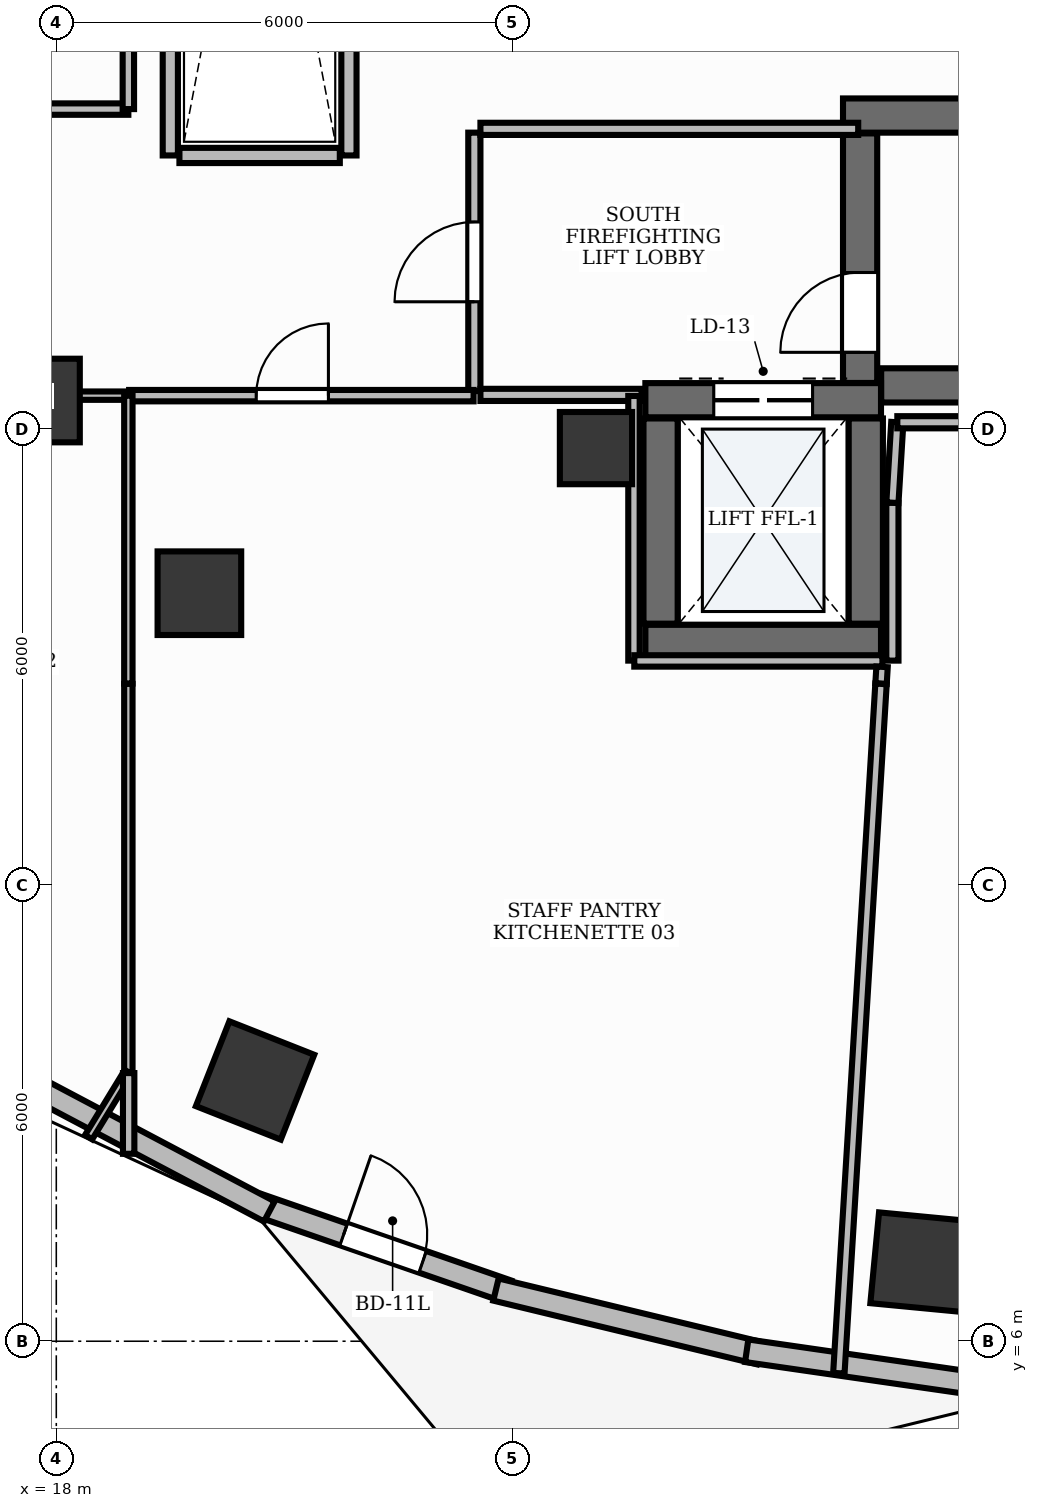
"""IFC4 building model, lengths in metres.
Left out: names, types, materials, properties, quantities, classifications, styles, units other than length and angle.
Written with IfcOpenShell. Run it as: python <this file> out.ifc"""

import sys

from ifc_helpers import new_model, si_unit, direction, frame, frame_2d, origin, origin_2d, place, context, subcontext, project, spatial, rectangle, extrude, element, fill, save


model = new_model("IFC4")
c1 = context("Model", 3, precision=1e-05, world=origin(), true_north=direction((0.0, 1.0)))
c2 = subcontext(c1, "Body", "Model", "MODEL_VIEW")
j1 = project(units=[si_unit("LENGTHUNIT", "METRE"), si_unit("PLANEANGLEUNIT", "RADIAN")], contexts=[c1])
p1 = place(None, origin())
s1 = spatial("IfcSite", under=j1, at=p1, CompositionType="ELEMENT")
p2 = place(p1, origin())
s2 = spatial("IfcBuilding", under=s1, at=p2, CompositionType="ELEMENT")
p3 = place(p2, frame((0.0, 0.0, 140.4)))
s3 = spatial("IfcBuildingStorey", under=s2, at=p3, CompositionType="ELEMENT", Elevation=140.4)
p4 = place(p3, frame((28.852, 18.575, 0.0), z_axis=(0.0, 0.0, 1.0), x_axis=(1.0, 0.0, 0.0)))
e1 = element("IfcWall", 1, at=p4, inside=s3, PredefinedType="SHEAR", context=c2, shape_type="SweptSolid", body=[
    extrude(rectangle(XDim=8.248, YDim=0.45, at=frame_2d((4.124, 0.0))), origin(), (0.0, 0.0, 1.0), 3.9),
])
p5 = place(p3, frame((28.35, 22.125, 0.0), z_axis=(0.0, 0.0, 1.0), x_axis=(1.0, 0.0, 0.0)))
e2 = element("IfcWall", 2, at=p5, inside=s3, PredefinedType="SHEAR", context=c2, shape_type="SweptSolid", body=[
    extrude(rectangle(XDim=8.75, YDim=0.45, at=frame_2d((4.375, 0.0))), origin(), (0.0, 0.0, 1.0), 3.9),
])
p6 = place(p3, frame((28.575, 18.607, 0.0), z_axis=(0.0, 0.0, 1.0), x_axis=(0.0, 1.0, 0.0)))
e3 = element("IfcWall", 3, at=p6, inside=s3, PredefinedType="SHEAR", context=c2, shape_type="SweptSolid", body=[
    extrude(rectangle(XDim=3.283, YDim=0.45, at=frame_2d((1.642, 0.0))), origin(), (0.0, 0.0, 1.0), 3.9),
])
p7 = place(p6, frame((0.403, 0.0, 0.0)))
e4 = element("IfcOpeningElement", 4, at=p7, cuts=e3, PredefinedType="OPENING", context=c2, shape_type="SweptSolid", body=[
    extrude(rectangle(XDim=1.05, YDim=2.15, at=frame_2d((0.525, 1.075))), frame((0.0, 0.24, 0.0), z_axis=(0.0, -1.0, 0.0), x_axis=(1.0, 0.0, 0.0)), (0.0, 0.0, 1.0), 0.48),
])
p8 = place(p3, frame((25.75, 15.2, 0.0), z_axis=(0.0, 0.0, 1.0), x_axis=(1.0, 0.0, 0.0)))
e5 = element("IfcWall", 5, at=p8, inside=s3, PredefinedType="SHEAR", context=c2, shape_type="SweptSolid", body=[
    extrude(rectangle(XDim=3.1, YDim=0.45, at=frame_2d((1.55, 0.0))), origin(), (0.0, 0.0, 1.0), 3.9),
])
p9 = place(p3, frame((25.75, 18.38, 0.0), z_axis=(0.0, 0.0, 1.0), x_axis=(1.0, 0.0, 0.0)))
e6 = element("IfcWall", 6, at=p9, inside=s3, PredefinedType="SHEAR", context=c2, shape_type="SweptSolid", body=[
    extrude(rectangle(XDim=3.1, YDim=0.45, at=frame_2d((1.55, 0.0))), origin(), (0.0, 0.0, 1.0), 3.9),
])
p10 = place(p9, frame((0.9, 0.0, 0.0)))
e7 = element("IfcOpeningElement", 7, at=p10, cuts=e6, PredefinedType="OPENING", context=c2, shape_type="SweptSolid", body=[
    extrude(rectangle(XDim=1.3, YDim=2.2, at=frame_2d((0.65, 1.1))), frame((0.0, 0.24, 0.0), z_axis=(0.0, -1.0, 0.0), x_axis=(1.0, 0.0, 0.0)), (0.0, 0.0, 1.0), 0.48),
])
for number, where, z_axis, x_axis in (
    (8, (25.95, 15.44, 0.0), (0.0, 0.0, 1.0), (0.0, 1.0, 0.0)),
    (9, (28.65, 15.44, 0.0), (0.0, 0.0, 1.0), (0.0, 1.0, 0.0)),
):
    element("IfcWall", number, at=place(p3, frame(where, z_axis=z_axis, x_axis=x_axis)), inside=s3, PredefinedType="SHEAR", context=c2, shape_type="SweptSolid", body=[
        extrude(rectangle(XDim=2.7, YDim=0.45, at=frame_2d((1.35, 0.0))), origin(), (0.0, 0.0, 1.0), 3.9),
    ])
p11 = place(p3, frame((25.1, 17.75, -0.0), z_axis=(0.0, 0.0, 1.0), x_axis=(1.0, 0.0, 0.0)))
e10 = element("IfcColumn", 10, at=p11, inside=s3, PredefinedType="PILASTER", context=c2, shape_type="SweptSolid", body=[
    extrude(rectangle(XDim=0.95, YDim=0.95, at=origin_2d()), origin(), (0.0, 0.0, 1.0), 3.901),
])
for number, where, z_axis, x_axis in (
    (11, (17.759, 18.376, -0.0), (0.0, 0.0, 1.0), (1.0, 0.0, 0.0)),
    (12, (19.883, 15.841, -0.0), (0.0, 0.0, 1.0), (1.0, 0.0, 0.0)),
):
    element("IfcColumn", number, at=place(p3, frame(where, z_axis=z_axis, x_axis=x_axis)), inside=s3, PredefinedType="COLUMN", context=c2, shape_type="SweptSolid", body=[
        extrude(rectangle(XDim=1.1, YDim=1.1, at=origin_2d()), origin(), (0.0, 0.0, 1.0), 3.901),
    ])
for number, where, z_axis, x_axis in (
    (13, (20.615, 9.431, -0.0), (0.0, 0.0, 1.0), (-0.93, 0.367, 0.0)),
    (14, (29.364, 7.041, -0.0), (0.0, 0.0, 1.0), (-0.995, 0.095, 0.0)),
):
    element("IfcColumn", number, at=place(p3, frame(where, z_axis=z_axis, x_axis=x_axis)), inside=s3, PredefinedType="COLUMN", context=c2, shape_type="SweptSolid", body=[
        extrude(rectangle(XDim=1.2, YDim=1.2, at=origin_2d()), origin(), (0.0, 0.0, 1.0), 3.901),
    ])
p12 = place(p3, frame((20.662, 7.792, 0.0), z_axis=(0.0, 0.0, 1.0), x_axis=(0.944878029854, -0.3274225232, 0.0)))
e15 = element("IfcWall", 15, at=p12, inside=s3, PredefinedType="STANDARD", context=c2, shape_type="SweptSolid", body=[
    extrude(rectangle(XDim=3.467, YDim=0.3, at=frame_2d((1.734, 0.0))), origin(), (0.0, 0.0, 1.0), 3.47),
])
p13 = place(p12, frame((1.184, 0.0, 0.0)))
e16 = element("IfcOpeningElement", 16, at=p13, cuts=e15, PredefinedType="OPENING", context=c2, shape_type="SweptSolid", body=[
    extrude(rectangle(XDim=1.1, YDim=2.15, at=frame_2d((0.55, 1.075))), frame((0.0, 0.165, 0.0), z_axis=(0.0, -1.0, 0.0), x_axis=(1.0, 0.0, 0.0)), (0.0, 0.0, 1.0), 0.33),
])
p14 = place(p3, frame((14.967, 10.794, 0.0), z_axis=(0.0, 0.0, 1.0), x_axis=(0.883986649445, -0.467512142734, 0.0)))
e17 = element("IfcWall", 17, at=p14, inside=s3, PredefinedType="STANDARD", context=c2, shape_type="SweptSolid", body=[
    extrude(rectangle(XDim=6.601, YDim=0.3, at=frame_2d((3.301, 0.0))), origin(), (0.0, 0.0, 1.0), 3.9),
])
p15 = place(p3, frame((23.784, 6.68, 0.0), z_axis=(0.0, 0.0, 1.0), x_axis=(0.972043452321, -0.234801036625, 0.0)))
e18 = element("IfcWall", 18, at=p15, inside=s3, PredefinedType="STANDARD", context=c2, shape_type="SweptSolid", body=[
    extrude(rectangle(XDim=3.569, YDim=0.3, at=frame_2d((1.784, 0.0))), origin(), (0.0, 0.0, 1.0), 3.9),
])
p16 = place(p3, frame((27.083, 5.875, 0.0), z_axis=(0.0, 0.0, 1.0), x_axis=(0.989734732902, -0.142916613754, 0.0)))
e19 = element("IfcWall", 19, at=p16, inside=s3, PredefinedType="STANDARD", context=c2, shape_type="SweptSolid", body=[
    extrude(rectangle(XDim=3.611, YDim=0.3, at=frame_2d((1.806, 0.0))), origin(), (0.0, 0.0, 1.0), 3.47),
])
for number, where, z_axis, x_axis in (
    (20, (19.5, 21.6, 0.0), (0.0, 0.0, 1.0), (0.0, 1.0, 0.0)),
    (21, (21.85, 21.6, 0.0), (0.0, 0.0, 1.0), (0.0, 1.0, 0.0)),
):
    element("IfcWall", number, at=place(p3, frame(where, z_axis=z_axis, x_axis=x_axis)), inside=s3, PredefinedType="PARTITIONING", context=c2, shape_type="SweptSolid", body=[
        extrude(rectangle(XDim=10.8, YDim=0.2, at=frame_2d((5.4, 0.0))), origin(), (0.0, 0.0, 1.0), 2.91),
    ])
p17 = place(p3, frame((19.62, 21.6, 0.0), z_axis=(0.0, 0.0, 1.0), x_axis=(1.0, 0.0, 0.0)))
e22 = element("IfcWall", 22, at=p17, inside=s3, PredefinedType="PARTITIONING", context=c2, shape_type="SweptSolid", body=[
    extrude(rectangle(XDim=2.11, YDim=0.2, at=frame_2d((1.055, 0.0))), origin(), (0.0, 0.0, 1.0), 2.91),
])
p18 = place(p3, frame((23.5, 18.5, 0.0), z_axis=(0.0, 0.0, 1.0), x_axis=(0.0, 1.0, 0.0)))
e23 = element("IfcWall", 23, at=p18, inside=s3, PredefinedType="PARTITIONING", context=c2, shape_type="SweptSolid", body=[
    extrude(rectangle(XDim=3.4, YDim=0.16, at=frame_2d((1.7, 0.0))), origin(), (0.0, 0.0, 1.0), 2.91),
])
p19 = place(p18, frame((1.175, 0.0, 0.0)))
e24 = element("IfcOpeningElement", 24, at=p19, cuts=e23, PredefinedType="OPENING", context=c2, shape_type="SweptSolid", body=[
    extrude(rectangle(XDim=1.05, YDim=2.15, at=frame_2d((0.525, 1.075))), frame((0.0, 0.095, 0.0), z_axis=(0.0, -1.0, 0.0), x_axis=(1.0, 0.0, 0.0)), (0.0, 0.0, 1.0), 0.19),
])
p20 = place(p3, frame((23.58, 21.95, 0.0), z_axis=(0.0, 0.0, 1.0), x_axis=(1.0, 0.0, 0.0)))
e25 = element("IfcWall", 25, at=p20, inside=s3, PredefinedType="PARTITIONING", context=c2, shape_type="SweptSolid", body=[
    extrude(rectangle(XDim=4.97, YDim=0.16, at=frame_2d((2.485, 0.0))), origin(), (0.0, 0.0, 1.0), 2.91),
])
p21 = place(p3, frame((23.58, 18.45, 0.0), z_axis=(0.0, 0.0, 1.0), x_axis=(1.0, 0.0, 0.0)))
e26 = element("IfcWall", 26, at=p21, inside=s3, PredefinedType="PARTITIONING", context=c2, shape_type="SweptSolid", body=[
    extrude(rectangle(XDim=2.12, YDim=0.16, at=frame_2d((1.06, 0.0))), origin(), (0.0, 0.0, 1.0), 2.91),
])
p22 = place(p3, frame((18.948, 22.21, 0.0), z_axis=(0.0, 0.0, 1.0), x_axis=(-1.0, 0.0, 0.0)))
e27 = element("IfcWall", 27, at=p22, inside=s3, PredefinedType="PARTITIONING", context=c2, shape_type="SweptSolid", body=[
    extrude(rectangle(XDim=4.788, YDim=0.15, at=frame_2d((2.394, 0.0))), origin(), (0.0, 0.0, 1.0), 2.91),
])
p23 = place(p22, frame((2.073, 0.0, 0.0)))
e28 = element("IfcOpeningElement", 28, at=p23, cuts=e27, PredefinedType="OPENING", context=c2, shape_type="SweptSolid", body=[
    extrude(rectangle(XDim=0.95, YDim=2.15, at=frame_2d((0.475, 1.075))), frame((0.0, 0.09, 0.0), z_axis=(0.0, -1.0, 0.0), x_axis=(1.0, 0.0, 0.0)), (0.0, 0.0, 1.0), 0.18),
])
p24 = place(p3, frame((11.59, 18.44, 0.0), z_axis=(0.0, 0.0, 1.0), x_axis=(1.0, 0.0, 0.0)))
e29 = element("IfcWall", 29, at=p24, inside=s3, PredefinedType="MOVABLE", context=c2, shape_type="SweptSolid", body=[
    extrude(rectangle(XDim=7.358, YDim=0.11, at=frame_2d((3.679, 0.0))), origin(), (0.0, 0.0, 1.0), 2.91),
])
p25 = place(p24, frame((1.202, 0.0, 0.0)))
e30 = element("IfcOpeningElement", 30, at=p25, cuts=e29, PredefinedType="OPENING", context=c2, shape_type="SweptSolid", body=[
    extrude(rectangle(XDim=0.95, YDim=2.15, at=frame_2d((0.475, 1.075))), frame((0.0, 0.07, 0.0), z_axis=(0.0, -1.0, 0.0), x_axis=(1.0, 0.0, 0.0)), (0.0, 0.0, 1.0), 0.14),
])
p26 = place(p3, frame((18.958, 18.44, 0.0), z_axis=(0.0, 0.0, 1.0), x_axis=(1.0, 0.0, 0.0)))
e31 = element("IfcWall", 31, at=p26, inside=s3, PredefinedType="PARTITIONING", context=c2, shape_type="SweptSolid", body=[
    extrude(rectangle(XDim=4.532, YDim=0.15, at=frame_2d((2.266, 0.0))), origin(), (0.0, 0.0, 1.0), 2.91),
])
p27 = place(p26, frame((1.672, 0.0, 0.0)))
e32 = element("IfcOpeningElement", 32, at=p27, cuts=e31, PredefinedType="OPENING", context=c2, shape_type="SweptSolid", body=[
    extrude(rectangle(XDim=0.95, YDim=2.15, at=frame_2d((0.475, 1.075))), frame((0.0, 0.09, 0.0), z_axis=(0.0, -1.0, 0.0), x_axis=(1.0, 0.0, 0.0)), (0.0, 0.0, 1.0), 0.18),
])
p28 = place(p3, frame((18.948, 28.043, 0.0), z_axis=(0.0, 0.0, 1.0), x_axis=(0.0, -1.0, 0.0)))
e33 = element("IfcWall", 33, at=p28, inside=s3, PredefinedType="PARTITIONING", context=c2, shape_type="SweptSolid", body=[
    extrude(rectangle(XDim=5.833, YDim=0.15, at=frame_2d((2.917, 0.0))), origin(), (0.0, 0.0, 1.0), 2.91),
])
p29 = place(p3, frame((18.948, 18.44, 0.0), z_axis=(0.0, 0.0, 1.0), x_axis=(0.0, -1.0, 0.0)))
e34 = element("IfcWall", 34, at=p29, inside=s3, PredefinedType="MOVABLE", context=c2, shape_type="SweptSolid", body=[
    extrude(rectangle(XDim=3.788, YDim=0.11, at=frame_2d((1.894, 0.0))), origin(), (0.0, 0.0, 1.0), 2.91),
])
p30 = place(p3, frame((18.948, 14.648, 0.0), z_axis=(0.0, 0.0, 1.0), x_axis=(0.0, -1.0, 0.0)))
e35 = element("IfcWall", 35, at=p30, inside=s3, PredefinedType="MOVABLE", context=c2, shape_type="SweptSolid", body=[
    extrude(rectangle(XDim=5.107, YDim=0.11, at=frame_2d((2.554, 0.0))), origin(), (0.0, 0.0, 1.0), 2.91),
])
p31 = place(p3, frame((18.948, 9.54, 0.0), z_axis=(0.0, 0.0, 1.0), x_axis=(-0.520996942726, -0.853558542615, 0.0)))
e36 = element("IfcWall", 36, at=p31, inside=s3, PredefinedType="MOVABLE", context=c2, shape_type="SweptSolid", body=[
    extrude(rectangle(XDim=1.003, YDim=0.11, at=frame_2d((0.501, 0.0))), origin(), (0.0, 0.0, 1.0), 2.91),
])
p32 = place(p3, frame((25.6, 18.436, 0.0), z_axis=(0.0, 0.0, 1.0), x_axis=(0.0, -1.0, 0.0)))
e37 = element("IfcWall", 37, at=p32, inside=s3, PredefinedType="PARTITIONING", context=c2, shape_type="SweptSolid", body=[
    extrude(rectangle(XDim=3.482, YDim=0.15, at=frame_2d((1.741, 0.0))), origin(), (0.0, 0.0, 1.0), 2.91),
])
p33 = place(p3, frame((25.604, 14.95, 0.0), z_axis=(0.0, 0.0, 1.0), x_axis=(1.0, 0.0, 0.0)))
e38 = element("IfcWall", 38, at=p33, inside=s3, PredefinedType="PARTITIONING", context=c2, shape_type="SweptSolid", body=[
    extrude(rectangle(XDim=3.264, YDim=0.15, at=frame_2d((1.632, 0.0))), origin(), (0.0, 0.0, 1.0), 2.91),
])
p34 = place(p3, frame((28.864, 14.872, 0.0), z_axis=(0.0, 0.0, 1.0), x_axis=(-0.060929869836, -0.998142049491, 0.0)))
e39 = element("IfcWall", 39, at=p34, inside=s3, PredefinedType="PARTITIONING", context=c2, shape_type="SweptSolid", body=[
    extrude(rectangle(XDim=0.22, YDim=0.15, at=frame_2d((0.11, 0.0))), origin(), (0.0, 0.0, 1.0), 2.91),
])
p35 = place(p3, frame((28.85, 14.648, 0.0), z_axis=(0.0, 0.0, 1.0), x_axis=(-0.06105324167, -0.998134510816, 0.0)))
e40 = element("IfcWall", 40, at=p35, inside=s3, PredefinedType="PARTITIONING", context=c2, shape_type="SweptSolid", body=[
    extrude(rectangle(XDim=9.085, YDim=0.15, at=frame_2d((4.542, 0.0))), origin(), (0.0, 0.0, 1.0), 2.91),
])
p36 = place(p3, frame((18.952, 8.466, 0.0), z_axis=(0.0, 0.0, 1.0), x_axis=(0.0, 1.0, 0.0)))
e41 = element("IfcWall", 41, at=p36, inside=s3, PredefinedType="PARTITIONING", context=c2, shape_type="SweptSolid", body=[
    extrude(rectangle(XDim=1.062, YDim=0.15, at=frame_2d((0.531, 0.0))), origin(), (0.0, 0.0, 1.0), 2.91),
])
p37 = place(p3, frame((29.0, 14.954, 0.0), z_axis=(0.0, 0.0, 1.0), x_axis=(0.0, 1.0, 0.0)))
e42 = element("IfcWall", 42, at=p37, inside=s3, PredefinedType="PARTITIONING", context=c2, shape_type="SweptSolid", body=[
    extrude(rectangle(XDim=2.077, YDim=0.16, at=frame_2d((1.039, 0.0))), origin(), (0.0, 0.0, 1.0), 2.91),
])
p38 = place(p3, frame((29.0, 17.031, 0.0), z_axis=(0.0, 0.0, 1.0), x_axis=(0.061002414414, 0.998137618485, 0.0)))
e43 = element("IfcWall", 43, at=p38, inside=s3, PredefinedType="PARTITIONING", context=c2, shape_type="SweptSolid", body=[
    extrude(rectangle(XDim=1.061, YDim=0.16, at=frame_2d((0.53, 0.0))), origin(), (0.0, 0.0, 1.0), 2.91),
])
p39 = place(p3, frame((29.065, 18.09, 0.0), z_axis=(0.0, 0.0, 1.0), x_axis=(1.0, 0.0, 0.0)))
e44 = element("IfcWall", 44, at=p39, inside=s3, PredefinedType="PARTITIONING", context=c2, shape_type="SweptSolid", body=[
    extrude(rectangle(XDim=8.285, YDim=0.16, at=frame_2d((4.143, 0.0))), origin(), (0.0, 0.0, 1.0), 2.91),
])
p40 = place(p13, origin())
e45 = element("IfcDoor", 45, at=p40, inside=s3, OperationType="SINGLE_SWING_LEFT", PredefinedType="DOOR", context=c2, shape_type="SweptSolid", body=[
    extrude(rectangle(XDim=1.1, YDim=2.15, at=frame_2d((0.55, 1.075))), frame((0.0, 0.025, 0.0), z_axis=(0.0, -1.0, 0.0), x_axis=(1.0, 0.0, 0.0)), (0.0, 0.0, 1.0), 0.05),
])
fill(e16, e45)
p41 = place(p7, origin())
e46 = element("IfcDoor", 46, at=p41, inside=s3, OperationType="SINGLE_SWING_LEFT", PredefinedType="DOOR", context=c2, shape_type="SweptSolid", body=[
    extrude(rectangle(XDim=1.05, YDim=2.15, at=frame_2d((0.525, 1.075))), frame((0.0, 0.025, 0.0), z_axis=(0.0, -1.0, 0.0), x_axis=(1.0, 0.0, 0.0)), (0.0, 0.0, 1.0), 0.05),
])
fill(e4, e46)
p42 = place(p10, origin())
e47 = element("IfcDoor", 47, at=p42, inside=s3, OperationType="DOUBLE_DOOR_SLIDING", PredefinedType="DOOR", context=c2, shape_type="SweptSolid", body=[
    extrude(rectangle(XDim=1.3, YDim=2.2, at=frame_2d((0.65, 1.1))), frame((0.0, 0.025, 0.0), z_axis=(0.0, -1.0, 0.0), x_axis=(1.0, 0.0, 0.0)), (0.0, 0.0, 1.0), 0.05),
])
fill(e7, e47)
p43 = place(p19, origin())
e48 = element("IfcDoor", 48, at=p43, inside=s3, OperationType="SINGLE_SWING_LEFT", PredefinedType="DOOR", context=c2, shape_type="SweptSolid", body=[
    extrude(rectangle(XDim=1.05, YDim=2.15, at=frame_2d((0.525, 1.075))), frame((0.0, 0.025, 0.0), z_axis=(0.0, -1.0, 0.0), x_axis=(1.0, 0.0, 0.0)), (0.0, 0.0, 1.0), 0.05),
])
fill(e24, e48)
p44 = place(p27, origin())
e49 = element("IfcDoor", 49, at=p44, inside=s3, OperationType="SINGLE_SWING_RIGHT", PredefinedType="DOOR", context=c2, shape_type="SweptSolid", body=[
    extrude(rectangle(XDim=0.95, YDim=2.15, at=frame_2d((0.475, 1.075))), frame((0.0, 0.025, 0.0), z_axis=(0.0, -1.0, 0.0), x_axis=(1.0, 0.0, 0.0)), (0.0, 0.0, 1.0), 0.05),
])
fill(e32, e49)
save(model, sys.argv[1])
